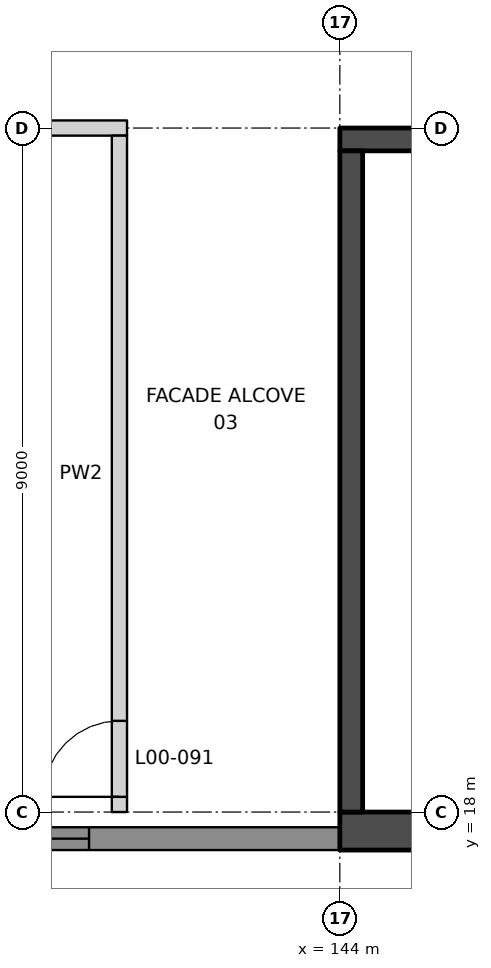
"""IFC4 building model, lengths in metres.
Left out: names, types, materials, properties, quantities, classifications, styles, units other than length and angle.
Written with IfcOpenShell. Run it as: python <this file> out.ifc"""

import sys

from ifc_helpers import new_model, si_unit, direction, frame, frame_2d, origin, place, context, subcontext, project, spatial, rectangle, extrude, element, fill, save


model = new_model("IFC4")
c1 = context("Model", 3, precision=1e-05, world=origin(), true_north=direction((0.0, 1.0)))
c2 = subcontext(c1, "Body", "Model", "MODEL_VIEW")
j1 = project(units=[si_unit("LENGTHUNIT", "METRE"), si_unit("PLANEANGLEUNIT", "RADIAN")], contexts=[c1])
p1 = place(None, origin())
s1 = spatial("IfcSite", under=j1, at=p1, CompositionType="ELEMENT")
p2 = place(p1, origin())
s2 = spatial("IfcBuilding", under=s1, at=p2, CompositionType="ELEMENT")
p3 = place(p2, origin())
s3 = spatial("IfcBuildingStorey", under=s2, at=p3, CompositionType="ELEMENT", Elevation=0.0)
p4 = place(p3, frame((135.45, 27.0, 0.0), z_axis=(0.0, 0.0, 1.0), x_axis=(1.0, 0.0, 0.0)))
e1 = element("IfcWall", 1, at=p4, inside=s3, PredefinedType="PARTITIONING", context=c2, shape_type="SweptSolid", body=[
    extrude(rectangle(XDim=5.75, YDim=0.2, at=frame_2d((2.875, 0.0))), origin(), (0.0, 0.0, 1.0), 5.75),
])
p5 = place(p3, frame((141.1, 18.0, 0.0), z_axis=(0.0, 0.0, 1.0), x_axis=(0.0, 1.0, 0.0)))
e2 = element("IfcWall", 2, at=p5, inside=s3, PredefinedType="PARTITIONING", context=c2, shape_type="SweptSolid", body=[
    extrude(rectangle(XDim=8.9, YDim=0.2, at=frame_2d((4.45, 0.0))), origin(), (0.0, 0.0, 1.0), 7.0),
])
p6 = place(p5, frame((0.2, 0.0, 0.0)))
e3 = element("IfcOpeningElement", 3, at=p6, cuts=e2, PredefinedType="OPENING", context=c2, shape_type="SweptSolid", body=[
    extrude(rectangle(XDim=1.0, YDim=2.1, at=frame_2d((0.5, 1.05))), frame((0.0, 0.11, 0.0), z_axis=(0.0, -1.0, 0.0), x_axis=(1.0, 0.0, 0.0)), (0.0, 0.0, 1.0), 0.22),
])
p7 = place(p3, frame((135.5, 17.65, 0.0), z_axis=(0.0, 0.0, 1.0), x_axis=(1.0, 0.0, 0.0)))
e4 = element("IfcWall", 4, at=p7, inside=s3, PredefinedType="SOLIDWALL", context=c2, shape_type="SweptSolid", body=[
    extrude(rectangle(XDim=8.5, YDim=0.3, at=frame_2d((4.25, 0.0))), origin(), (0.0, 0.0, 1.0), 7.0),
])
p8 = place(p7, frame((2.8, 0.0, 0.0)))
e5 = element("IfcOpeningElement", 5, at=p8, cuts=e4, PredefinedType="OPENING", context=c2, shape_type="SweptSolid", body=[
    extrude(rectangle(XDim=2.4, YDim=2.4, at=frame_2d((1.2, 1.2))), frame((0.0, 0.16, 0.0), z_axis=(0.0, -1.0, 0.0), x_axis=(1.0, 0.0, 0.0)), (0.0, 0.0, 1.0), 0.32),
])
p9 = place(p3, frame((144.0, 26.85, 0.0), z_axis=(0.0, 0.0, 1.0), x_axis=(1.0, 0.0, 0.0)))
e6 = element("IfcWall", 6, at=p9, inside=s3, PredefinedType="SHEAR", context=c2, shape_type="SweptSolid", body=[
    extrude(rectangle(XDim=18.0, YDim=0.3, at=frame_2d((9.0, 0.0))), origin(), (0.0, 0.0, 1.0), 7.0),
])
p10 = place(p9, frame((8.6, 0.0, 0.0)))
e7 = element("IfcOpeningElement", 7, at=p10, cuts=e6, PredefinedType="OPENING", context=c2, shape_type="SweptSolid", body=[
    extrude(rectangle(XDim=1.2, YDim=2.1, at=frame_2d((0.6, 1.05))), frame((0.0, 0.16, 0.0), z_axis=(0.0, -1.0, 0.0), x_axis=(1.0, 0.0, 0.0)), (0.0, 0.0, 1.0), 0.32),
])
p11 = place(p3, frame((144.0, 17.75, 0.0), z_axis=(0.0, 0.0, 1.0), x_axis=(1.0, 0.0, 0.0)))
e8 = element("IfcWall", 8, at=p11, inside=s3, PredefinedType="SHEAR", context=c2, shape_type="SweptSolid", body=[
    extrude(rectangle(XDim=18.0, YDim=0.5, at=frame_2d((9.0, 0.0))), origin(), (0.0, 0.0, 1.0), 7.0),
])
p12 = place(p11, frame((7.9, 0.0, 0.0)))
e9 = element("IfcOpeningElement", 9, at=p12, cuts=e8, PredefinedType="OPENING", context=c2, shape_type="SweptSolid", body=[
    extrude(rectangle(XDim=2.6, YDim=2.4, at=frame_2d((1.3, 1.2))), frame((0.0, 0.26, 0.0), z_axis=(0.0, -1.0, 0.0), x_axis=(1.0, 0.0, 0.0)), (0.0, 0.0, 1.0), 0.52),
])
p13 = place(p3, frame((144.15, 26.7, 0.0), z_axis=(0.0, 0.0, 1.0), x_axis=(0.0, -1.0, 0.0)))
e10 = element("IfcWall", 10, at=p13, inside=s3, PredefinedType="SHEAR", context=c2, shape_type="SweptSolid", body=[
    extrude(rectangle(XDim=8.7, YDim=0.3, at=frame_2d((4.35, 0.0))), origin(), (0.0, 0.0, 1.0), 7.0),
])
p14 = place(p6, origin())
e11 = element("IfcDoor", 11, at=p14, inside=s3, OperationType="SINGLE_SWING_LEFT", PredefinedType="DOOR", context=c2, shape_type="SweptSolid", body=[
    extrude(rectangle(XDim=1.0, YDim=2.1, at=frame_2d((0.5, 1.05))), frame((0.0, 0.025, 0.0), z_axis=(0.0, -1.0, 0.0), x_axis=(1.0, 0.0, 0.0)), (0.0, 0.0, 1.0), 0.05),
])
fill(e3, e11)
p15 = place(p8, frame((2.4, 0.0, 0.0), z_axis=(0.0, 0.0, 1.0), x_axis=(-1.0, 0.0, 0.0)))
e12 = element("IfcDoor", 12, at=p15, inside=s3, OperationType="DOUBLE_DOOR_SINGLE_SWING", PredefinedType="DOOR", context=c2, shape_type="SweptSolid", body=[
    extrude(rectangle(XDim=2.4, YDim=2.4, at=frame_2d((1.2, 1.2))), frame((0.0, 0.025, 0.0), z_axis=(0.0, -1.0, 0.0), x_axis=(1.0, 0.0, 0.0)), (0.0, 0.0, 1.0), 0.05),
])
fill(e5, e12)
save(model, sys.argv[1])
